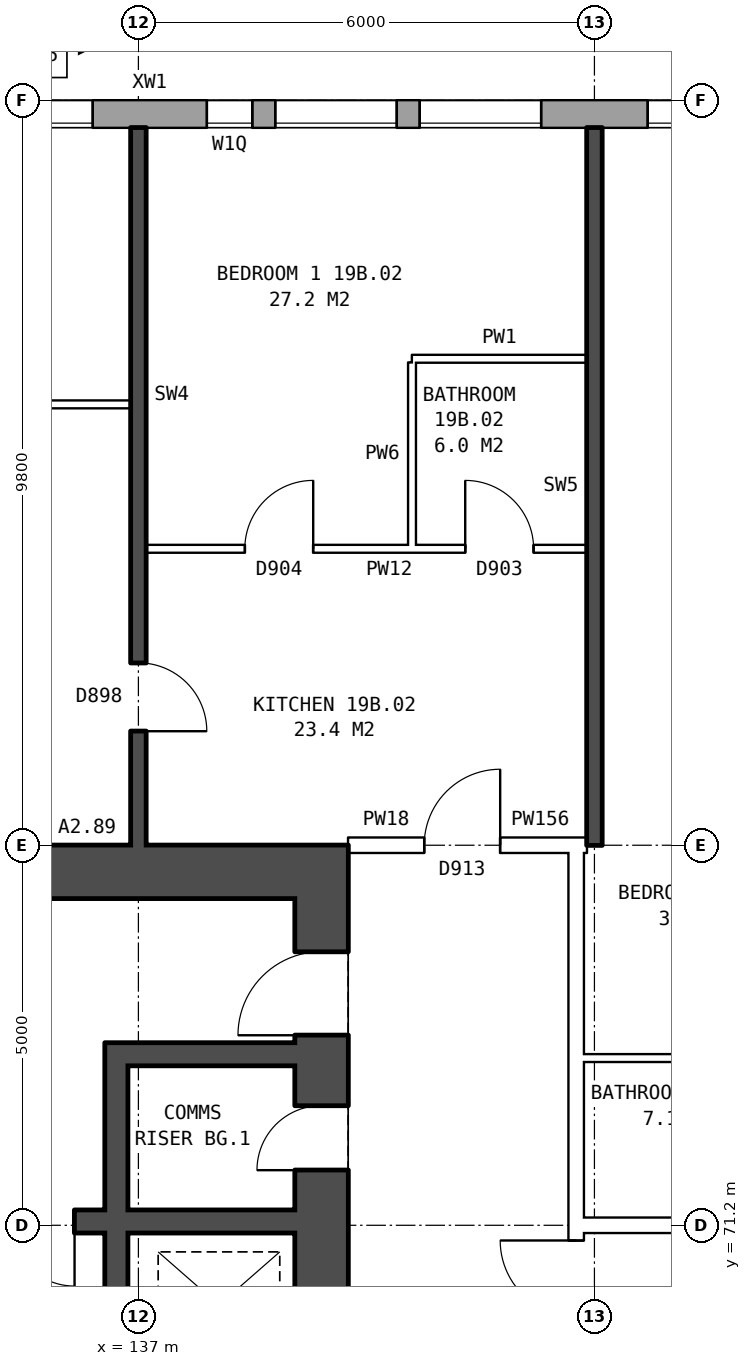
"""IFC4 building model, lengths in metres.
Left out: names, types, materials, properties, quantities, classifications, styles, units other than length and angle.
Written with IfcOpenShell. Run it as: python <this file> out.ifc"""

import sys

from ifc_helpers import new_model, si_unit, direction, frame, frame_2d, origin, place, context, subcontext, project, spatial, rectangle, extrude, element, fill, save


model = new_model("IFC4")
c1 = context("Model", 3, precision=1e-05, world=origin(), true_north=direction((0.0, 1.0)))
c2 = subcontext(c1, "Body", "Model", "MODEL_VIEW")
j1 = project(units=[si_unit("LENGTHUNIT", "METRE"), si_unit("PLANEANGLEUNIT", "RADIAN")], contexts=[c1])
p1 = place(None, origin())
s1 = spatial("IfcSite", under=j1, at=p1, CompositionType="ELEMENT")
p2 = place(p1, origin())
s2 = spatial("IfcBuilding", under=s1, at=p2, CompositionType="ELEMENT")
p3 = place(p2, frame((0.0, 0.0, 71.6)))
s3 = spatial("IfcBuildingStorey", under=s2, at=p3, CompositionType="ELEMENT", Elevation=71.6)
p4 = place(p3, frame((172.175, 85.82, 0.0), z_axis=(0.0, 0.0, 1.0), x_axis=(-1.0, 0.0, 0.0)))
e1 = element("IfcWall", 1, at=p4, inside=s3, PredefinedType="STANDARD", context=c2, shape_type="SweptSolid", body=[
    extrude(rectangle(XDim=38.101, YDim=0.36, at=frame_2d((19.05, 0.0))), origin(), (0.0, 0.0, 1.0), 2.85),
])
p5 = place(p4, frame((0.3, 0.0, 0.8)))
e2 = element("IfcOpeningElement", 2, at=p5, cuts=e1, PredefinedType="OPENING", context=c2, shape_type="SweptSolid", body=[
    extrude(rectangle(XDim=1.0, YDim=1.8, at=frame_2d((0.5, 0.9))), frame((0.0, 0.19, 0.0), z_axis=(0.0, -1.0, 0.0), x_axis=(1.0, 0.0, 0.0)), (0.0, 0.0, 1.0), 0.38),
])
p6 = place(p4, frame((5.875, 0.0, 0.8)))
e3 = element("IfcOpeningElement", 3, at=p6, cuts=e1, PredefinedType="OPENING", context=c2, shape_type="SweptSolid", body=[
    extrude(rectangle(XDim=1.6, YDim=1.8, at=frame_2d((0.8, 0.9))), frame((0.0, 0.19, 0.0), z_axis=(0.0, -1.0, 0.0), x_axis=(1.0, 0.0, 0.0)), (0.0, 0.0, 1.0), 0.38),
])
p7 = place(p4, frame((8.875, 0.0, 0.8)))
e4 = element("IfcOpeningElement", 4, at=p7, cuts=e1, PredefinedType="OPENING", context=c2, shape_type="SweptSolid", body=[
    extrude(rectangle(XDim=1.6, YDim=1.8, at=frame_2d((0.8, 0.9))), frame((0.0, 0.19, 0.0), z_axis=(0.0, -1.0, 0.0), x_axis=(1.0, 0.0, 0.0)), (0.0, 0.0, 1.0), 0.38),
])
p8 = place(p4, frame((11.875, 0.0, 0.8)))
e5 = element("IfcOpeningElement", 5, at=p8, cuts=e1, PredefinedType="OPENING", context=c2, shape_type="SweptSolid", body=[
    extrude(rectangle(XDim=1.6, YDim=1.8, at=frame_2d((0.8, 0.9))), frame((0.0, 0.19, 0.0), z_axis=(0.0, -1.0, 0.0), x_axis=(1.0, 0.0, 0.0)), (0.0, 0.0, 1.0), 0.38),
])
p9 = place(p4, frame((14.875, 0.0, 0.8)))
e6 = element("IfcOpeningElement", 6, at=p9, cuts=e1, PredefinedType="OPENING", context=c2, shape_type="SweptSolid", body=[
    extrude(rectangle(XDim=1.6, YDim=1.8, at=frame_2d((0.8, 0.9))), frame((0.0, 0.19, 0.0), z_axis=(0.0, -1.0, 0.0), x_axis=(1.0, 0.0, 0.0)), (0.0, 0.0, 1.0), 0.38),
])
p10 = place(p4, frame((17.875, 0.0, 0.8)))
e7 = element("IfcOpeningElement", 7, at=p10, cuts=e1, PredefinedType="OPENING", context=c2, shape_type="SweptSolid", body=[
    extrude(rectangle(XDim=1.6, YDim=1.8, at=frame_2d((0.8, 0.9))), frame((0.0, 0.19, 0.0), z_axis=(0.0, -1.0, 0.0), x_axis=(1.0, 0.0, 0.0)), (0.0, 0.0, 1.0), 0.38),
])
p11 = place(p4, frame((20.875, 0.0, 0.8)))
e8 = element("IfcOpeningElement", 8, at=p11, cuts=e1, PredefinedType="OPENING", context=c2, shape_type="SweptSolid", body=[
    extrude(rectangle(XDim=1.6, YDim=1.8, at=frame_2d((0.8, 0.9))), frame((0.0, 0.19, 0.0), z_axis=(0.0, -1.0, 0.0), x_axis=(1.0, 0.0, 0.0)), (0.0, 0.0, 1.0), 0.38),
])
p12 = place(p4, frame((23.875, 0.0, 0.8)))
e9 = element("IfcOpeningElement", 9, at=p12, cuts=e1, PredefinedType="OPENING", context=c2, shape_type="SweptSolid", body=[
    extrude(rectangle(XDim=1.6, YDim=1.8, at=frame_2d((0.8, 0.9))), frame((0.0, 0.19, 0.0), z_axis=(0.0, -1.0, 0.0), x_axis=(1.0, 0.0, 0.0)), (0.0, 0.0, 1.0), 0.38),
])
p13 = place(p4, frame((26.875, 0.0, 0.8)))
e10 = element("IfcOpeningElement", 10, at=p13, cuts=e1, PredefinedType="OPENING", context=c2, shape_type="SweptSolid", body=[
    extrude(rectangle(XDim=1.6, YDim=1.8, at=frame_2d((0.8, 0.9))), frame((0.0, 0.19, 0.0), z_axis=(0.0, -1.0, 0.0), x_axis=(1.0, 0.0, 0.0)), (0.0, 0.0, 1.0), 0.38),
])
p14 = place(p4, frame((29.875, 0.0, 0.8)))
e11 = element("IfcOpeningElement", 11, at=p14, cuts=e1, PredefinedType="OPENING", context=c2, shape_type="SweptSolid", body=[
    extrude(rectangle(XDim=1.6, YDim=1.8, at=frame_2d((0.8, 0.9))), frame((0.0, 0.19, 0.0), z_axis=(0.0, -1.0, 0.0), x_axis=(1.0, 0.0, 0.0)), (0.0, 0.0, 1.0), 0.38),
])
p15 = place(p4, frame((31.775, 0.0, 0.8)))
e12 = element("IfcOpeningElement", 12, at=p15, cuts=e1, PredefinedType="OPENING", context=c2, shape_type="SweptSolid", body=[
    extrude(rectangle(XDim=1.6, YDim=1.8, at=frame_2d((0.8, 0.9))), frame((0.0, 0.19, 0.0), z_axis=(0.0, -1.0, 0.0), x_axis=(1.0, 0.0, 0.0)), (0.0, 0.0, 1.0), 0.38),
])
p16 = place(p4, frame((35.775, 0.0, 1.7)))
e13 = element("IfcOpeningElement", 13, at=p16, cuts=e1, PredefinedType="OPENING", context=c2, shape_type="SweptSolid", body=[
    extrude(rectangle(XDim=0.6, YDim=0.9, at=frame_2d((0.3, 0.45))), frame((0.0, 0.19, 0.0), z_axis=(0.0, -1.0, 0.0), x_axis=(1.0, 0.0, 0.0)), (0.0, 0.0, 1.0), 0.38),
])
p17 = place(p4, frame((1.6, 0.0, 1.6)))
e14 = element("IfcOpeningElement", 14, at=p17, cuts=e1, PredefinedType="OPENING", context=c2, shape_type="SweptSolid", body=[
    extrude(rectangle(XDim=0.6, YDim=0.9, at=frame_2d((0.3, 0.45))), frame((0.0, 0.19, 0.0), z_axis=(0.0, -1.0, 0.0), x_axis=(1.0, 0.0, 0.0)), (0.0, 0.0, 1.0), 0.38),
])
p18 = place(p4, frame((3.5, 0.0, 0.8)))
e15 = element("IfcOpeningElement", 15, at=p18, cuts=e1, PredefinedType="OPENING", context=c2, shape_type="SweptSolid", body=[
    extrude(rectangle(XDim=1.4, YDim=0.9, at=frame_2d((0.7, 0.45))), frame((0.0, 0.19, 0.0), z_axis=(0.0, -1.0, 0.0), x_axis=(1.0, 0.0, 0.0)), (0.0, 0.0, 1.0), 0.38),
])
p19 = place(p4, frame((33.675, 0.0, 0.8)))
e16 = element("IfcOpeningElement", 16, at=p19, cuts=e1, PredefinedType="OPENING", context=c2, shape_type="SweptSolid", body=[
    extrude(rectangle(XDim=0.6, YDim=1.2, at=frame_2d((0.3, 0.6))), frame((0.0, 0.19, 0.0), z_axis=(0.0, -1.0, 0.0), x_axis=(1.0, 0.0, 0.0)), (0.0, 0.0, 1.0), 0.38),
])
p20 = place(p4, frame((36.675, 0.0, 0.8)))
e17 = element("IfcOpeningElement", 17, at=p20, cuts=e1, PredefinedType="OPENING", context=c2, shape_type="SweptSolid", body=[
    extrude(rectangle(XDim=1.0, YDim=1.8, at=frame_2d((0.5, 0.9))), frame((0.0, 0.19, 0.0), z_axis=(0.0, -1.0, 0.0), x_axis=(1.0, 0.0, 0.0)), (0.0, 0.0, 1.0), 0.38),
])
p21 = place(p3, frame((139.41, 64.5, 0.0), z_axis=(0.0, 0.0, 1.0), x_axis=(0.0, 1.0, 0.0)))
e18 = element("IfcWall", 18, at=p21, inside=s3, PredefinedType="SHEAR", context=c2, shape_type="SweptSolid", body=[
    extrude(rectangle(XDim=11.0, YDim=0.7, at=frame_2d((5.5, 0.0))), origin(), (0.0, 0.0, 1.0), 2.85),
])
p22 = place(p21, frame((0.625, 0.0, 0.0)))
e19 = element("IfcOpeningElement", 19, at=p22, cuts=e18, PredefinedType="OPENING", context=c2, shape_type="SweptSolid", body=[
    extrude(rectangle(XDim=1.1, YDim=2.1, at=frame_2d((0.55, 1.05))), frame((0.0, 0.36, 0.0), z_axis=(0.0, -1.0, 0.0), x_axis=(1.0, 0.0, 0.0)), (0.0, 0.0, 1.0), 0.72),
])
p23 = place(p21, frame((9.2, 0.0, 0.0)))
e20 = element("IfcOpeningElement", 20, at=p23, cuts=e18, PredefinedType="OPENING", context=c2, shape_type="SweptSolid", body=[
    extrude(rectangle(XDim=1.1, YDim=2.1, at=frame_2d((0.55, 1.05))), frame((0.0, 0.36, 0.0), z_axis=(0.0, -1.0, 0.0), x_axis=(1.0, 0.0, 0.0)), (0.0, 0.0, 1.0), 0.72),
])
p24 = place(p21, frame((7.425, 0.0, 0.0)))
e21 = element("IfcOpeningElement", 21, at=p24, cuts=e18, PredefinedType="OPENING", context=c2, shape_type="SweptSolid", body=[
    extrude(rectangle(XDim=0.85, YDim=2.1, at=frame_2d((0.425, 1.05))), frame((0.0, 0.36, 0.0), z_axis=(0.0, -1.0, 0.0), x_axis=(1.0, 0.0, 0.0)), (0.0, 0.0, 1.0), 0.72),
])
p25 = place(p3, frame((139.76, 75.85, 0.0), z_axis=(0.0, 0.0, 1.0), x_axis=(-1.0, 0.0, 0.0)))
e22 = element("IfcWall", 22, at=p25, inside=s3, PredefinedType="SHEAR", context=c2, shape_type="SweptSolid", body=[
    extrude(rectangle(XDim=8.4, YDim=0.7, at=frame_2d((4.2, 0.0))), origin(), (0.0, 0.0, 1.0), 2.85),
])
p26 = place(p3, frame((139.06, 71.25, 0.0), z_axis=(0.0, 0.0, 1.0), x_axis=(-1.0, 0.0, 0.0)))
e23 = element("IfcWall", 23, at=p26, inside=s3, PredefinedType="SHEAR", context=c2, shape_type="SweptSolid", body=[
    extrude(rectangle(XDim=7.0, YDim=0.3, at=frame_2d((3.5, 0.0))), origin(), (0.0, 0.0, 1.0), 2.85),
])
p27 = place(p26, frame((4.6, 0.0, 0.0)))
e24 = element("IfcOpeningElement", 24, at=p27, cuts=e23, PredefinedType="OPENING", context=c2, shape_type="SweptSolid", body=[
    extrude(rectangle(XDim=1.1, YDim=2.1, at=frame_2d((0.55, 1.05))), frame((0.0, 0.16, 0.0), z_axis=(0.0, -1.0, 0.0), x_axis=(1.0, 0.0, 0.0)), (0.0, 0.0, 1.0), 0.32),
])
p28 = place(p26, frame((2.9, 0.0, 0.0)))
e25 = element("IfcOpeningElement", 25, at=p28, cuts=e23, PredefinedType="OPENING", context=c2, shape_type="SweptSolid", body=[
    extrude(rectangle(XDim=0.85, YDim=2.1, at=frame_2d((0.425, 1.05))), frame((0.0, 0.16, 0.0), z_axis=(0.0, -1.0, 0.0), x_axis=(1.0, 0.0, 0.0)), (0.0, 0.0, 1.0), 0.32),
])
p29 = place(p3, frame((139.06, 73.45, 0.0), z_axis=(0.0, 0.0, 1.0), x_axis=(-1.0, 0.0, 0.0)))
e26 = element("IfcWall", 26, at=p29, inside=s3, PredefinedType="SHEAR", context=c2, shape_type="SweptSolid", body=[
    extrude(rectangle(XDim=2.2, YDim=0.3, at=frame_2d((1.1, 0.0))), origin(), (0.0, 0.0, 1.0), 2.85),
])
p30 = place(p3, frame((136.71, 67.0, 0.0), z_axis=(0.0, 0.0, 1.0), x_axis=(0.0, 1.0, 0.0)))
e27 = element("IfcWall", 27, at=p30, inside=s3, PredefinedType="SHEAR", context=c2, shape_type="SweptSolid", body=[
    extrude(rectangle(XDim=4.1, YDim=0.3, at=frame_2d((2.05, 0.0))), origin(), (0.0, 0.0, 1.0), 2.85),
])
p31 = place(p3, frame((136.71, 71.4, 0.0), z_axis=(0.0, 0.0, 1.0), x_axis=(0.0, 1.0, 0.0)))
e28 = element("IfcWall", 28, at=p31, inside=s3, PredefinedType="SHEAR", context=c2, shape_type="SweptSolid", body=[
    extrude(rectangle(XDim=2.2, YDim=0.3, at=frame_2d((1.1, 0.0))), origin(), (0.0, 0.0, 1.0), 2.85),
])
p32 = place(p3, frame((142.76, 63.9, 0.0), z_axis=(0.0, 0.0, 1.0), x_axis=(0.0, 1.0, 0.0)))
e29 = element("IfcWall", 29, at=p32, inside=s3, PredefinedType="PARTITIONING", context=c2, shape_type="SweptSolid", body=[
    extrude(rectangle(XDim=12.2, YDim=0.2, at=frame_2d((6.1, 0.0))), origin(), (0.0, 0.0, 1.0), 2.85),
])
p33 = place(p32, frame((5.1, 0.0, 0.0)))
e30 = element("IfcOpeningElement", 30, at=p33, cuts=e29, PredefinedType="OPENING", context=c2, shape_type="SweptSolid", body=[
    extrude(rectangle(XDim=2.0, YDim=2.1, at=frame_2d((1.0, 1.05))), frame((0.0, 0.11, 0.0), z_axis=(0.0, -1.0, 0.0), x_axis=(1.0, 0.0, 0.0)), (0.0, 0.0, 1.0), 0.22),
])
p34 = place(p3, frame((142.76, 71.2, 0.0), z_axis=(0.0, 0.0, 1.0), x_axis=(1.0, 0.0, 0.0)))
e31 = element("IfcWall", 31, at=p34, inside=s3, PredefinedType="PARTITIONING", context=c2, shape_type="SweptSolid", body=[
    extrude(rectangle(XDim=14.48, YDim=0.2, at=frame_2d((7.24, 0.0))), origin(), (0.0, 0.0, 1.0), 2.85),
])
p35 = place(p34, frame((4.24, 0.0, 0.0)))
e32 = element("IfcOpeningElement", 32, at=p35, cuts=e31, PredefinedType="OPENING", context=c2, shape_type="SweptSolid", body=[
    extrude(rectangle(XDim=1.0, YDim=2.1, at=frame_2d((0.5, 1.05))), frame((0.0, 0.11, 0.0), z_axis=(0.0, -1.0, 0.0), x_axis=(1.0, 0.0, 0.0)), (0.0, 0.0, 1.0), 0.22),
])
p36 = place(p34, frame((7.24, 0.0, 0.0)))
e33 = element("IfcOpeningElement", 33, at=p36, cuts=e31, PredefinedType="OPENING", context=c2, shape_type="SweptSolid", body=[
    extrude(rectangle(XDim=1.0, YDim=2.1, at=frame_2d((0.5, 1.05))), frame((0.0, 0.11, 0.0), z_axis=(0.0, -1.0, 0.0), x_axis=(1.0, 0.0, 0.0)), (0.0, 0.0, 1.0), 0.22),
])
p37 = place(p3, frame((142.76, 73.4, 0.0), z_axis=(0.0, 0.0, 1.0), x_axis=(1.0, 0.0, 0.0)))
e34 = element("IfcWall", 34, at=p37, inside=s3, PredefinedType="PARTITIONING", context=c2, shape_type="SweptSolid", body=[
    extrude(rectangle(XDim=3.24, YDim=0.1, at=frame_2d((1.62, 0.0))), origin(), (0.0, 0.0, 1.0), 2.85),
])
p38 = place(p3, frame((139.76, 76.2, 0.0), z_axis=(0.0, 0.0, 1.0), x_axis=(1.0, 0.0, 0.0)))
e35 = element("IfcWall", 35, at=p38, inside=s3, PredefinedType="PARTITIONING", context=c2, shape_type="SweptSolid", body=[
    extrude(rectangle(XDim=3.0, YDim=0.2, at=frame_2d((1.5, 0.0))), origin(), (0.0, 0.0, 1.0), 2.85),
])
p39 = place(p38, frame((1.0, 0.0, 0.0)))
e36 = element("IfcOpeningElement", 36, at=p39, cuts=e35, PredefinedType="OPENING", context=c2, shape_type="SweptSolid", body=[
    extrude(rectangle(XDim=1.0, YDim=2.1, at=frame_2d((0.5, 1.05))), frame((0.0, 0.11, 0.0), z_axis=(0.0, -1.0, 0.0), x_axis=(1.0, 0.0, 0.0)), (0.0, 0.0, 1.0), 0.22),
])
p40 = place(p3, frame((142.76, 76.2, 0.0), z_axis=(0.0, 0.0, 1.0), x_axis=(1.0, 0.0, 0.0)))
e37 = element("IfcWall", 37, at=p40, inside=s3, PredefinedType="PARTITIONING", context=c2, shape_type="SweptSolid", body=[
    extrude(rectangle(XDim=0.14, YDim=0.2, at=frame_2d((0.07, 0.0))), origin(), (0.0, 0.0, 1.0), 2.85),
])
p41 = place(p3, frame((137.1, 80.1, 0.0), z_axis=(0.0, 0.0, 1.0), x_axis=(1.0, 0.0, 0.0)))
e38 = element("IfcWall", 38, at=p41, inside=s3, PredefinedType="PARTITIONING", context=c2, shape_type="SweptSolid", body=[
    extrude(rectangle(XDim=5.8, YDim=0.1, at=frame_2d((2.9, 0.0))), origin(), (0.0, 0.0, 1.0), 2.85),
])
p42 = place(p41, frame((1.3, 0.0, 0.0)))
e39 = element("IfcOpeningElement", 39, at=p42, cuts=e38, PredefinedType="OPENING", context=c2, shape_type="SweptSolid", body=[
    extrude(rectangle(XDim=0.9, YDim=2.1, at=frame_2d((0.45, 1.05))), frame((0.0, 0.06, 0.0), z_axis=(0.0, -1.0, 0.0), x_axis=(1.0, 0.0, 0.0)), (0.0, 0.0, 1.0), 0.12),
])
p43 = place(p41, frame((4.2, 0.0, 0.0)))
e40 = element("IfcOpeningElement", 40, at=p43, cuts=e38, PredefinedType="OPENING", context=c2, shape_type="SweptSolid", body=[
    extrude(rectangle(XDim=0.9, YDim=2.1, at=frame_2d((0.45, 1.05))), frame((0.0, 0.06, 0.0), z_axis=(0.0, -1.0, 0.0), x_axis=(1.0, 0.0, 0.0)), (0.0, 0.0, 1.0), 0.12),
])
p44 = place(p3, frame((131.36, 82.0, 0.0), z_axis=(0.0, 0.0, 1.0), x_axis=(1.0, 0.0, 0.0)))
e41 = element("IfcWall", 41, at=p44, inside=s3, PredefinedType="PARTITIONING", context=c2, shape_type="SweptSolid", body=[
    extrude(rectangle(XDim=5.54, YDim=0.1, at=frame_2d((2.77, 0.0))), origin(), (0.0, 0.0, 1.0), 2.85),
])
p45 = place(p44, frame((2.32, 0.0, 0.0)))
e42 = element("IfcOpeningElement", 42, at=p45, cuts=e41, PredefinedType="OPENING", context=c2, shape_type="SweptSolid", body=[
    extrude(rectangle(XDim=0.9, YDim=2.1, at=frame_2d((0.45, 1.05))), frame((0.0, 0.06, 0.0), z_axis=(0.0, -1.0, 0.0), x_axis=(1.0, 0.0, 0.0)), (0.0, 0.0, 1.0), 0.12),
])
p46 = place(p3, frame((140.6, 82.6, 0.0), z_axis=(0.0, 0.0, 1.0), x_axis=(1.0, 0.0, 0.0)))
e43 = element("IfcWall", 43, at=p46, inside=s3, PredefinedType="PARTITIONING", context=c2, shape_type="SweptSolid", body=[
    extrude(rectangle(XDim=2.3, YDim=0.1, at=frame_2d((1.15, 0.0))), origin(), (0.0, 0.0, 1.0), 2.85),
])
p47 = place(p3, frame((137.0, 76.2, 0.0), z_axis=(0.0, 0.0, 1.0), x_axis=(0.0, 1.0, 0.0)))
e44 = element("IfcWall", 44, at=p47, inside=s3, PredefinedType="SOLIDWALL", context=c2, shape_type="SweptSolid", body=[
    extrude(rectangle(XDim=9.44, YDim=0.2, at=frame_2d((4.72, 0.0))), origin(), (0.0, 0.0, 1.0), 2.85),
])
p48 = place(p47, frame((1.5, 0.0, 0.0)))
e45 = element("IfcOpeningElement", 45, at=p48, cuts=e44, PredefinedType="OPENING", context=c2, shape_type="SweptSolid", body=[
    extrude(rectangle(XDim=0.9, YDim=2.1, at=frame_2d((0.45, 1.05))), frame((0.0, 0.11, 0.0), z_axis=(0.0, -1.0, 0.0), x_axis=(1.0, 0.0, 0.0)), (0.0, 0.0, 1.0), 0.22),
])
p49 = place(p3, frame((140.6, 80.15, 0.0), z_axis=(0.0, 0.0, 1.0), x_axis=(0.0, 1.0, 0.0)))
e46 = element("IfcWall", 46, at=p49, inside=s3, PredefinedType="PARTITIONING", context=c2, shape_type="SweptSolid", body=[
    extrude(rectangle(XDim=2.4, YDim=0.1, at=frame_2d((1.2, 0.0))), origin(), (0.0, 0.0, 1.0), 2.85),
])
p50 = place(p3, frame((143.0, 76.2, 0.0), z_axis=(0.0, 0.0, 1.0), x_axis=(0.0, 1.0, 0.0)))
e47 = element("IfcWall", 47, at=p50, inside=s3, PredefinedType="SOLIDWALL", context=c2, shape_type="SweptSolid", body=[
    extrude(rectangle(XDim=9.44, YDim=0.2, at=frame_2d((4.72, 0.0))), origin(), (0.0, 0.0, 1.0), 2.85),
])
p51 = place(p13, origin())
e48 = element("IfcWindow", 48, at=p51, inside=s3, PartitioningType="SINGLE_PANEL", PredefinedType="WINDOW", context=c2, shape_type="SweptSolid", body=[
    extrude(rectangle(XDim=1.6, YDim=1.8, at=frame_2d((0.8, 0.9))), frame((0.0, 0.15, 0.0), z_axis=(0.0, -1.0, 0.0), x_axis=(1.0, 0.0, 0.0)), (0.0, 0.0, 1.0), 0.06),
])
fill(e10, e48)
p52 = place(p14, origin())
e49 = element("IfcWindow", 49, at=p52, inside=s3, PartitioningType="SINGLE_PANEL", PredefinedType="WINDOW", context=c2, shape_type="SweptSolid", body=[
    extrude(rectangle(XDim=1.6, YDim=1.8, at=frame_2d((0.8, 0.9))), frame((0.0, 0.15, 0.0), z_axis=(0.0, -1.0, 0.0), x_axis=(1.0, 0.0, 0.0)), (0.0, 0.0, 1.0), 0.06),
])
fill(e11, e49)
p53 = place(p15, origin())
e50 = element("IfcWindow", 50, at=p53, inside=s3, PartitioningType="SINGLE_PANEL", PredefinedType="WINDOW", context=c2, shape_type="SweptSolid", body=[
    extrude(rectangle(XDim=1.6, YDim=1.8, at=frame_2d((0.8, 0.9))), frame((0.0, 0.15, 0.0), z_axis=(0.0, -1.0, 0.0), x_axis=(1.0, 0.0, 0.0)), (0.0, 0.0, 1.0), 0.06),
])
fill(e12, e50)
p54 = place(p16, origin())
e51 = element("IfcWindow", 51, at=p54, inside=s3, PartitioningType="SINGLE_PANEL", PredefinedType="WINDOW", context=c2, shape_type="SweptSolid", body=[
    extrude(rectangle(XDim=0.6, YDim=0.9, at=frame_2d((0.3, 0.45))), frame((0.0, 0.15, 0.0), z_axis=(0.0, -1.0, 0.0), x_axis=(1.0, 0.0, 0.0)), (0.0, 0.0, 1.0), 0.06),
])
fill(e13, e51)
p55 = place(p23, origin())
e52 = element("IfcDoor", 52, at=p55, inside=s3, OperationType="SINGLE_SWING_LEFT", PredefinedType="DOOR", context=c2, shape_type="SweptSolid", body=[
    extrude(rectangle(XDim=1.1, YDim=2.1, at=frame_2d((0.55, 1.05))), frame((0.0, 0.335, 0.0), z_axis=(0.0, -1.0, 0.0), x_axis=(1.0, 0.0, 0.0)), (0.0, 0.0, 1.0), 0.05),
])
fill(e20, e52)
p56 = place(p24, origin())
e53 = element("IfcDoor", 53, at=p56, inside=s3, OperationType="SINGLE_SWING_LEFT", PredefinedType="DOOR", context=c2, shape_type="SweptSolid", body=[
    extrude(rectangle(XDim=0.85, YDim=2.1, at=frame_2d((0.425, 1.05))), frame((0.0, 0.335, 0.0), z_axis=(0.0, -1.0, 0.0), x_axis=(1.0, 0.0, 0.0)), (0.0, 0.0, 1.0), 0.05),
])
fill(e21, e53)
p57 = place(p28, origin())
e54 = element("IfcDoor", 54, at=p57, inside=s3, OperationType="SINGLE_SWING_LEFT", PredefinedType="DOOR", context=c2, shape_type="SweptSolid", body=[
    extrude(rectangle(XDim=0.85, YDim=2.1, at=frame_2d((0.425, 1.05))), frame((0.0, 0.025, 0.0), z_axis=(0.0, -1.0, 0.0), x_axis=(1.0, 0.0, 0.0)), (0.0, 0.0, 1.0), 0.05),
])
fill(e25, e54)
p58 = place(p33, origin())
e55 = element("IfcDoor", 55, at=p58, inside=s3, OperationType="DOUBLE_DOOR_SINGLE_SWING", PredefinedType="DOOR", context=c2, shape_type="SweptSolid", body=[
    extrude(rectangle(XDim=2.0, YDim=2.1, at=frame_2d((1.0, 1.05))), frame((0.0, 0.025, 0.0), z_axis=(0.0, -1.0, 0.0), x_axis=(1.0, 0.0, 0.0)), (0.0, 0.0, 1.0), 0.05),
])
fill(e30, e55)
p59 = place(p42, origin())
e56 = element("IfcDoor", 56, at=p59, inside=s3, OperationType="SINGLE_SWING_RIGHT", PredefinedType="DOOR", context=c2, shape_type="SweptSolid", body=[
    extrude(rectangle(XDim=0.9, YDim=2.1, at=frame_2d((0.45, 1.05))), frame((0.0, 0.025, 0.0), z_axis=(0.0, -1.0, 0.0), x_axis=(1.0, 0.0, 0.0)), (0.0, 0.0, 1.0), 0.05),
])
fill(e39, e56)
p60 = place(p39, origin())
e57 = element("IfcDoor", 57, at=p60, inside=s3, OperationType="SINGLE_SWING_RIGHT", PredefinedType="DOOR", context=c2, shape_type="SweptSolid", body=[
    extrude(rectangle(XDim=1.0, YDim=2.1, at=frame_2d((0.5, 1.05))), frame((0.0, 0.025, 0.0), z_axis=(0.0, -1.0, 0.0), x_axis=(1.0, 0.0, 0.0)), (0.0, 0.0, 1.0), 0.05),
])
fill(e36, e57)
p61 = place(p48, frame((0.9, 0.0, 0.0), z_axis=(0.0, 0.0, 1.0), x_axis=(-1.0, 0.0, 0.0)))
e58 = element("IfcDoor", 58, at=p61, inside=s3, OperationType="SINGLE_SWING_RIGHT", PredefinedType="DOOR", context=c2, shape_type="SweptSolid", body=[
    extrude(rectangle(XDim=0.9, YDim=2.1, at=frame_2d((0.45, 1.05))), frame((0.0, 0.025, 0.0), z_axis=(0.0, -1.0, 0.0), x_axis=(1.0, 0.0, 0.0)), (0.0, 0.0, 1.0), 0.05),
])
fill(e45, e58)
p62 = place(p43, origin())
e59 = element("IfcDoor", 59, at=p62, inside=s3, OperationType="SINGLE_SWING_LEFT", PredefinedType="DOOR", context=c2, shape_type="SweptSolid", body=[
    extrude(rectangle(XDim=0.9, YDim=2.1, at=frame_2d((0.45, 1.05))), frame((0.0, 0.025, 0.0), z_axis=(0.0, -1.0, 0.0), x_axis=(1.0, 0.0, 0.0)), (0.0, 0.0, 1.0), 0.05),
])
fill(e40, e59)
p63 = place(p19, origin())
e60 = element("IfcWindow", 60, at=p63, inside=s3, PartitioningType="SINGLE_PANEL", PredefinedType="WINDOW", context=c2, shape_type="SweptSolid", body=[
    extrude(rectangle(XDim=0.6, YDim=1.2, at=frame_2d((0.3, 0.6))), frame((0.0, 0.15, 0.0), z_axis=(0.0, -1.0, 0.0), x_axis=(1.0, 0.0, 0.0)), (0.0, 0.0, 1.0), 0.06),
])
fill(e16, e60)
save(model, sys.argv[1])
